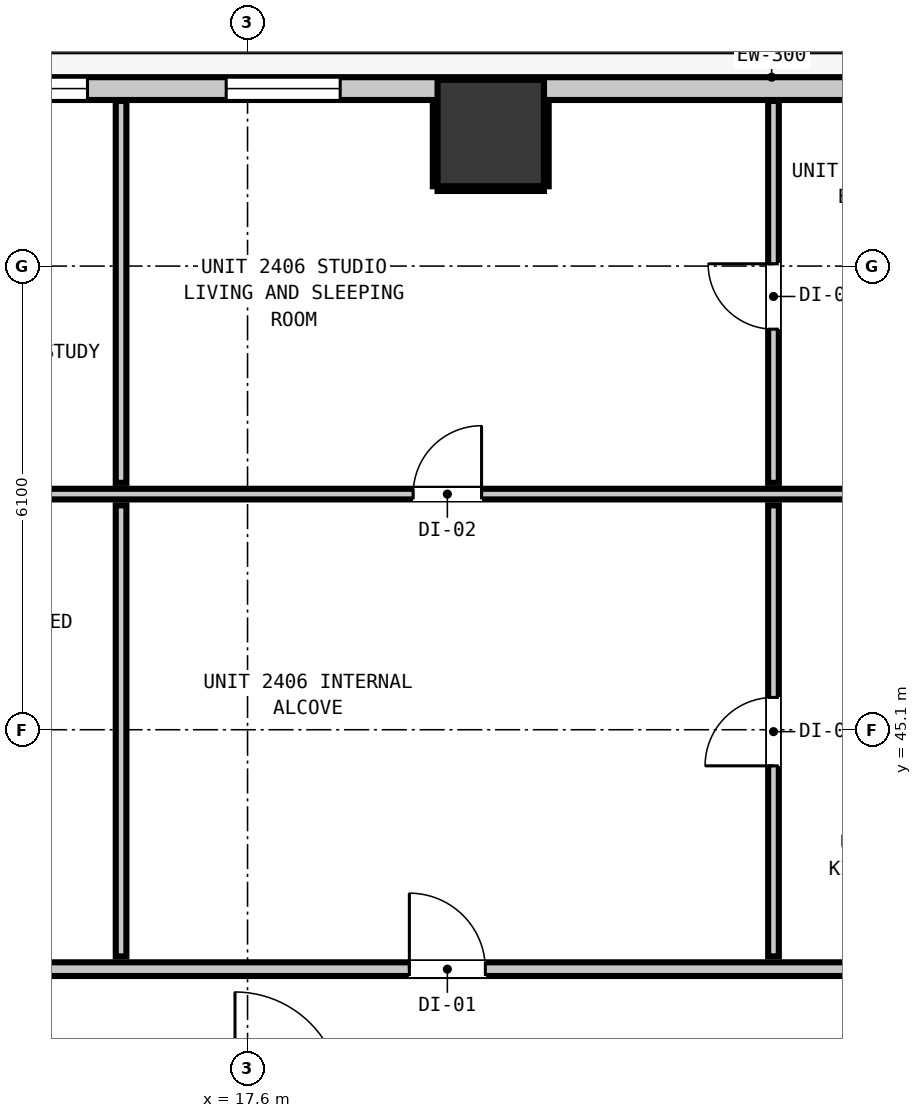
"""IFC4 building model, lengths in metres.
Left out: names, types, materials, properties, quantities, classifications, styles, units other than length and angle.
Written with IfcOpenShell. Run it as: python <this file> out.ifc"""

import sys

from ifc_helpers import new_model, si_unit, direction, frame, frame_2d, origin, origin_2d, place, context, subcontext, project, spatial, rectangle, extrude, element, fill, save


model = new_model("IFC4")
c1 = context("Model", 3, precision=1e-05, world=origin(), true_north=direction((0.0, 1.0)))
c2 = subcontext(c1, "Body", "Model", "MODEL_VIEW")
j1 = project(units=[si_unit("LENGTHUNIT", "METRE"), si_unit("PLANEANGLEUNIT", "RADIAN")], contexts=[c1])
p1 = place(None, origin())
s1 = spatial("IfcSite", under=j1, at=p1, CompositionType="ELEMENT")
p2 = place(p1, origin())
s2 = spatial("IfcBuilding", under=s1, at=p2, CompositionType="ELEMENT")
p3 = place(p2, frame((0.0, 0.0, 85.08)))
s3 = spatial("IfcBuildingStorey", under=s2, at=p3, CompositionType="ELEMENT", Elevation=85.08)
p4 = place(p3, frame((20.8, 52.95, 0.0), z_axis=(0.0, 0.0, 1.0), x_axis=(1.0, 0.0, 0.0)))
e1 = element("IfcColumn", 1, at=p4, inside=s3, PredefinedType="COLUMN", context=c2, shape_type="SweptSolid", body=[
    extrude(rectangle(XDim=1.4, YDim=1.4, at=origin_2d()), origin(), (0.0, 0.0, 1.0), 3.32),
])
p5 = place(p3, frame((4.165, 53.535, 0.0), z_axis=(0.0, 0.0, 1.0), x_axis=(1.0, 0.0, 0.0)))
e2 = element("IfcWall", 2, at=p5, inside=s3, PredefinedType="STANDARD", context=c2, shape_type="SweptSolid", body=[
    extrude(rectangle(XDim=37.47, YDim=0.3, at=frame_2d((18.735, 0.0))), origin(), (0.0, 0.0, 1.0), 2.96),
])
p6 = place(p5, frame((1.951, 0.0, 0.0)))
e3 = element("IfcOpeningElement", 3, at=p6, cuts=e2, PredefinedType="OPENING", context=c2, shape_type="SweptSolid", body=[
    extrude(rectangle(XDim=1.0, YDim=2.15, at=frame_2d((0.5, 1.075))), frame((0.0, 0.16, 0.0), z_axis=(0.0, -1.0, 0.0), x_axis=(1.0, 0.0, 0.0)), (0.0, 0.0, 1.0), 0.32),
])
p7 = place(p5, frame((4.603, 0.0, 0.85)))
e4 = element("IfcOpeningElement", 4, at=p7, cuts=e2, PredefinedType="OPENING", context=c2, shape_type="SweptSolid", body=[
    extrude(rectangle(XDim=1.5, YDim=1.8, at=frame_2d((0.75, 0.9))), frame((0.0, 0.16, 0.0), z_axis=(0.0, -1.0, 0.0), x_axis=(1.0, 0.0, 0.0)), (0.0, 0.0, 1.0), 0.32),
])
p8 = place(p5, frame((0.324, 0.0, 0.85)))
e5 = element("IfcOpeningElement", 5, at=p8, cuts=e2, PredefinedType="OPENING", context=c2, shape_type="SweptSolid", body=[
    extrude(rectangle(XDim=0.58, YDim=1.5, at=frame_2d((0.29, 0.75))), frame((0.0, 0.16, 0.0), z_axis=(0.0, -1.0, 0.0), x_axis=(1.0, 0.0, 0.0)), (0.0, 0.0, 1.0), 0.32),
])
p9 = place(p5, frame((10.279, 0.0, 0.85)))
e6 = element("IfcOpeningElement", 6, at=p9, cuts=e2, PredefinedType="OPENING", context=c2, shape_type="SweptSolid", body=[
    extrude(rectangle(XDim=1.05, YDim=1.65, at=frame_2d((0.525, 0.825))), frame((0.0, 0.16, 0.0), z_axis=(0.0, -1.0, 0.0), x_axis=(1.0, 0.0, 0.0)), (0.0, 0.0, 1.0), 0.32),
])
p10 = place(p5, frame((13.154, 0.0, 0.85)))
e7 = element("IfcOpeningElement", 7, at=p10, cuts=e2, PredefinedType="OPENING", context=c2, shape_type="SweptSolid", body=[
    extrude(rectangle(XDim=1.5, YDim=1.8, at=frame_2d((0.75, 0.9))), frame((0.0, 0.16, 0.0), z_axis=(0.0, -1.0, 0.0), x_axis=(1.0, 0.0, 0.0)), (0.0, 0.0, 1.0), 0.32),
])
p11 = place(p5, frame((28.597, 0.0, 0.85)))
e8 = element("IfcOpeningElement", 8, at=p11, cuts=e2, PredefinedType="OPENING", context=c2, shape_type="SweptSolid", body=[
    extrude(rectangle(XDim=1.5, YDim=1.8, at=frame_2d((0.75, 0.9))), frame((0.0, 0.16, 0.0), z_axis=(0.0, -1.0, 0.0), x_axis=(1.0, 0.0, 0.0)), (0.0, 0.0, 1.0), 0.32),
])
p12 = place(p5, frame((26.007, 0.0, 0.85)))
e9 = element("IfcOpeningElement", 9, at=p12, cuts=e2, PredefinedType="OPENING", context=c2, shape_type="SweptSolid", body=[
    extrude(rectangle(XDim=0.58, YDim=1.5, at=frame_2d((0.29, 0.75))), frame((0.0, 0.16, 0.0), z_axis=(0.0, -1.0, 0.0), x_axis=(1.0, 0.0, 0.0)), (0.0, 0.0, 1.0), 0.32),
])
p13 = place(p5, frame((35.682, 0.0, 0.85)))
e10 = element("IfcOpeningElement", 10, at=p13, cuts=e2, PredefinedType="OPENING", context=c2, shape_type="SweptSolid", body=[
    extrude(rectangle(XDim=1.5, YDim=1.8, at=frame_2d((0.75, 0.9))), frame((0.0, 0.16, 0.0), z_axis=(0.0, -1.0, 0.0), x_axis=(1.0, 0.0, 0.0)), (0.0, 0.0, 1.0), 0.32),
])
p14 = place(p3, frame((1.827, 41.95, 0.0), z_axis=(0.0, 0.0, 1.0), x_axis=(1.0, 0.0, 0.0)))
e11 = element("IfcWall", 11, at=p14, inside=s3, PredefinedType="PARTITIONING", context=c2, shape_type="SweptSolid", body=[
    extrude(rectangle(XDim=42.146, YDim=0.18, at=frame_2d((21.073, 0.0))), origin(), (0.0, 0.0, 1.0), 2.96),
])
p15 = place(p14, frame((8.668, 0.0, 0.0)))
e12 = element("IfcOpeningElement", 12, at=p15, cuts=e11, PredefinedType="OPENING", context=c2, shape_type="SweptSolid", body=[
    extrude(rectangle(XDim=1.0, YDim=2.15, at=frame_2d((0.5, 1.075))), frame((0.0, 0.1, 0.0), z_axis=(0.0, -1.0, 0.0), x_axis=(1.0, 0.0, 0.0)), (0.0, 0.0, 1.0), 0.2),
])
p16 = place(p14, frame((17.902, 0.0, 0.0)))
e13 = element("IfcOpeningElement", 13, at=p16, cuts=e11, PredefinedType="OPENING", context=c2, shape_type="SweptSolid", body=[
    extrude(rectangle(XDim=1.0, YDim=2.15, at=frame_2d((0.5, 1.075))), frame((0.0, 0.1, 0.0), z_axis=(0.0, -1.0, 0.0), x_axis=(1.0, 0.0, 0.0)), (0.0, 0.0, 1.0), 0.2),
])
p17 = place(p14, frame((33.01, 0.0, 0.0)))
e14 = element("IfcOpeningElement", 14, at=p17, cuts=e11, PredefinedType="OPENING", context=c2, shape_type="SweptSolid", body=[
    extrude(rectangle(XDim=1.0, YDim=2.15, at=frame_2d((0.5, 1.075))), frame((0.0, 0.1, 0.0), z_axis=(0.0, -1.0, 0.0), x_axis=(1.0, 0.0, 0.0)), (0.0, 0.0, 1.0), 0.2),
])
p18 = place(p3, frame((11.82, 48.2, 0.0), z_axis=(0.0, 0.0, 1.0), x_axis=(1.0, 0.0, 0.0)))
e15 = element("IfcWall", 15, at=p18, inside=s3, PredefinedType="PARTITIONING", context=c2, shape_type="SweptSolid", body=[
    extrude(rectangle(XDim=32.153, YDim=0.14, at=frame_2d((16.076, 0.0))), origin(), (0.0, 0.0, 1.0), 2.96),
])
p19 = place(p18, frame((7.959, 0.0, 0.0)))
e16 = element("IfcOpeningElement", 16, at=p19, cuts=e15, PredefinedType="OPENING", context=c2, shape_type="SweptSolid", body=[
    extrude(rectangle(XDim=0.9, YDim=2.1, at=frame_2d((0.45, 1.05))), frame((0.0, 0.08, 0.0), z_axis=(0.0, -1.0, 0.0), x_axis=(1.0, 0.0, 0.0)), (0.0, 0.0, 1.0), 0.16),
])
p20 = place(p18, frame((23.067, 0.0, 0.0)))
e17 = element("IfcOpeningElement", 17, at=p20, cuts=e15, PredefinedType="OPENING", context=c2, shape_type="SweptSolid", body=[
    extrude(rectangle(XDim=0.9, YDim=2.1, at=frame_2d((0.45, 1.05))), frame((0.0, 0.08, 0.0), z_axis=(0.0, -1.0, 0.0), x_axis=(1.0, 0.0, 0.0)), (0.0, 0.0, 1.0), 0.16),
])
p21 = place(p3, frame((15.936, 42.118, 0.0), z_axis=(0.0, 0.0, 1.0), x_axis=(0.0, 1.0, 0.0)))
e18 = element("IfcWall", 18, at=p21, inside=s3, PredefinedType="PARTITIONING", context=c2, shape_type="SweptSolid", body=[
    extrude(rectangle(XDim=5.934, YDim=0.14, at=frame_2d((2.967, 0.0))), origin(), (0.0, 0.0, 1.0), 2.96),
])
p22 = place(p3, frame((15.936, 48.348, 0.0), z_axis=(0.0, 0.0, 1.0), x_axis=(0.0, 1.0, 0.0)))
e19 = element("IfcWall", 19, at=p22, inside=s3, PredefinedType="PARTITIONING", context=c2, shape_type="SweptSolid", body=[
    extrude(rectangle(XDim=5.025, YDim=0.14, at=frame_2d((2.513, 0.0))), origin(), (0.0, 0.0, 1.0), 2.96),
])
p23 = place(p3, frame((24.52, 42.118, 0.0), z_axis=(0.0, 0.0, 1.0), x_axis=(0.0, 1.0, 0.0)))
e20 = element("IfcWall", 20, at=p23, inside=s3, PredefinedType="PARTITIONING", context=c2, shape_type="SweptSolid", body=[
    extrude(rectangle(XDim=5.934, YDim=0.14, at=frame_2d((2.967, 0.0))), origin(), (0.0, 0.0, 1.0), 2.96),
])
p24 = place(p23, frame((2.507, 0.0, 0.0)))
e21 = element("IfcOpeningElement", 21, at=p24, cuts=e20, PredefinedType="OPENING", context=c2, shape_type="SweptSolid", body=[
    extrude(rectangle(XDim=0.9, YDim=2.1, at=frame_2d((0.45, 1.05))), frame((0.0, 0.08, 0.0), z_axis=(0.0, -1.0, 0.0), x_axis=(1.0, 0.0, 0.0)), (0.0, 0.0, 1.0), 0.16),
])
p25 = place(p3, frame((24.52, 48.348, 0.0), z_axis=(0.0, 0.0, 1.0), x_axis=(0.0, 1.0, 0.0)))
e22 = element("IfcWall", 22, at=p25, inside=s3, PredefinedType="PARTITIONING", context=c2, shape_type="SweptSolid", body=[
    extrude(rectangle(XDim=5.025, YDim=0.14, at=frame_2d((2.513, 0.0))), origin(), (0.0, 0.0, 1.0), 2.96),
])
p26 = place(p25, frame((2.022, 0.0, 0.0)))
e23 = element("IfcOpeningElement", 23, at=p26, cuts=e22, PredefinedType="OPENING", context=c2, shape_type="SweptSolid", body=[
    extrude(rectangle(XDim=0.86, YDim=2.02, at=frame_2d((0.43, 1.01))), frame((0.0, 0.08, 0.0), z_axis=(0.0, -1.0, 0.0), x_axis=(1.0, 0.0, 0.0)), (0.0, 0.0, 1.0), 0.16),
])
p27 = place(p3, frame((20.1, 52.218, 0.0), z_axis=(0.0, 0.0, 1.0), x_axis=(1.0, 0.0, 0.0)))
e24 = element("IfcWall", 24, at=p27, inside=s3, PredefinedType="PARTITIONING", context=c2, shape_type="SweptSolid", body=[
    extrude(rectangle(XDim=1.4, YDim=0.06, at=frame_2d((0.7, 0.0))), origin(), (0.0, 0.0, 1.0), 1.45),
])
for number, where, z_axis, x_axis in (
    (25, (20.068, 52.25, 0.0), (0.0, 0.0, 1.0), (0.0, 1.0, 0.0)),
    (26, (21.532, 52.25, 0.0), (0.0, 0.0, 1.0), (0.0, 1.0, 0.0)),
):
    element("IfcWall", number, at=place(p3, frame(where, z_axis=z_axis, x_axis=x_axis)), inside=s3, PredefinedType="PARTITIONING", context=c2, shape_type="SweptSolid", body=[
        extrude(rectangle(XDim=1.12, YDim=0.06, at=frame_2d((0.56, 0.0))), origin(), (0.0, 0.0, 1.0), 1.45),
    ])
p28 = place(p9, origin())
e27 = element("IfcWindow", 27, at=p28, inside=s3, PartitioningType="SINGLE_PANEL", PredefinedType="WINDOW", context=c2, shape_type="SweptSolid", body=[
    extrude(rectangle(XDim=1.05, YDim=1.65, at=frame_2d((0.525, 0.825))), frame((0.0, 0.03, 0.0), z_axis=(0.0, -1.0, 0.0), x_axis=(1.0, 0.0, 0.0)), (0.0, 0.0, 1.0), 0.06),
])
fill(e6, e27)
p29 = place(p10, origin())
e28 = element("IfcWindow", 28, at=p29, inside=s3, PartitioningType="SINGLE_PANEL", PredefinedType="WINDOW", context=c2, shape_type="SweptSolid", body=[
    extrude(rectangle(XDim=1.5, YDim=1.8, at=frame_2d((0.75, 0.9))), frame((0.0, 0.03, 0.0), z_axis=(0.0, -1.0, 0.0), x_axis=(1.0, 0.0, 0.0)), (0.0, 0.0, 1.0), 0.06),
])
fill(e7, e28)
p30 = place(p16, origin())
e29 = element("IfcDoor", 29, at=p30, inside=s3, OperationType="SINGLE_SWING_LEFT", PredefinedType="DOOR", context=c2, shape_type="SweptSolid", body=[
    extrude(rectangle(XDim=1.0, YDim=2.15, at=frame_2d((0.5, 1.075))), frame((0.0, 0.025, 0.0), z_axis=(0.0, -1.0, 0.0), x_axis=(1.0, 0.0, 0.0)), (0.0, 0.0, 1.0), 0.05),
])
fill(e13, e29)
p31 = place(p19, origin())
e30 = element("IfcDoor", 30, at=p31, inside=s3, OperationType="SINGLE_SWING_RIGHT", PredefinedType="DOOR", context=c2, shape_type="SweptSolid", body=[
    extrude(rectangle(XDim=0.9, YDim=2.1, at=frame_2d((0.45, 1.05))), frame((0.0, 0.025, 0.0), z_axis=(0.0, -1.0, 0.0), x_axis=(1.0, 0.0, 0.0)), (0.0, 0.0, 1.0), 0.05),
])
fill(e16, e30)
p32 = place(p24, origin())
e31 = element("IfcDoor", 31, at=p32, inside=s3, OperationType="SINGLE_SWING_LEFT", PredefinedType="DOOR", context=c2, shape_type="SweptSolid", body=[
    extrude(rectangle(XDim=0.9, YDim=2.1, at=frame_2d((0.45, 1.05))), frame((0.0, 0.025, 0.0), z_axis=(0.0, -1.0, 0.0), x_axis=(1.0, 0.0, 0.0)), (0.0, 0.0, 1.0), 0.05),
])
fill(e21, e31)
p33 = place(p26, origin())
e32 = element("IfcDoor", 32, at=p33, inside=s3, OperationType="SINGLE_SWING_RIGHT", PredefinedType="DOOR", context=c2, shape_type="SweptSolid", body=[
    extrude(rectangle(XDim=0.86, YDim=2.02, at=frame_2d((0.43, 1.01))), frame((0.0, 0.025, 0.0), z_axis=(0.0, -1.0, 0.0), x_axis=(1.0, 0.0, 0.0)), (0.0, 0.0, 1.0), 0.05),
])
fill(e23, e32)
save(model, sys.argv[1])
